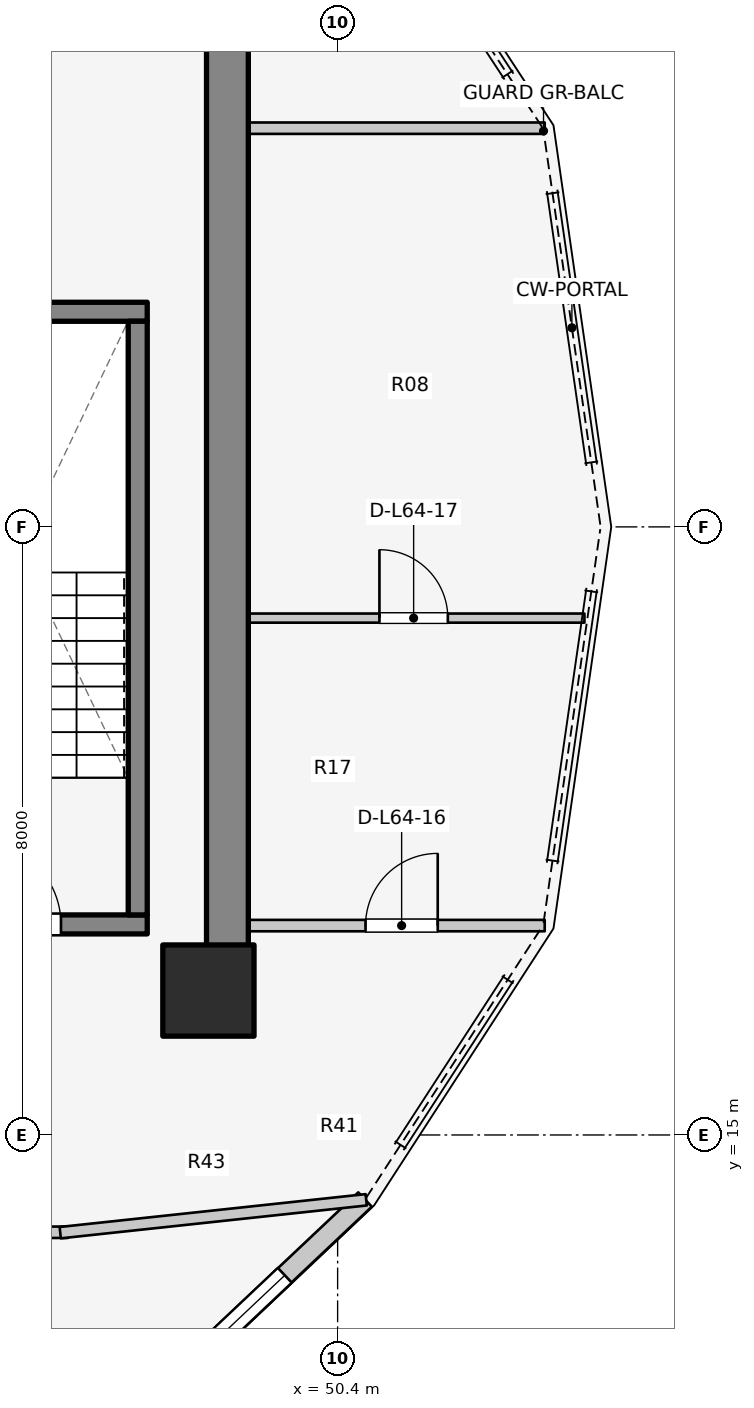
"""IFC4 building model, lengths in metres.
Left out: names, types, materials, properties, quantities, classifications, styles, units other than length and angle.
Written with IfcOpenShell. Run it as: python <this file> out.ifc"""

import sys

from ifc_helpers import new_model, si_unit, direction, frame, frame_2d, origin, origin_2d, place, context, subcontext, project, spatial, rectangle, extrude, element, fill, save


model = new_model("IFC4")
c1 = context("Model", 3, precision=1e-05, world=origin(), true_north=direction((0.0, 1.0)))
c2 = subcontext(c1, "Body", "Model", "MODEL_VIEW")
j1 = project(units=[si_unit("LENGTHUNIT", "METRE"), si_unit("PLANEANGLEUNIT", "RADIAN")], contexts=[c1])
p1 = place(None, origin())
s1 = spatial("IfcSite", under=j1, at=p1, CompositionType="ELEMENT")
p2 = place(p1, origin())
s2 = spatial("IfcBuilding", under=s1, at=p2, CompositionType="ELEMENT")
p3 = place(p2, frame((0.0, 0.0, 210.9)))
s3 = spatial("IfcBuildingStorey", under=s2, at=p3, CompositionType="ELEMENT", Elevation=210.9)
p4 = place(p3, frame((48.95, 17.05, 0.0), z_axis=(0.0, 0.0, 1.0), x_axis=(0.0, 1.0, 0.0)))
e1 = element("IfcWall", 1, at=p4, inside=s3, PredefinedType="SHEAR", context=c2, shape_type="SweptSolid", body=[
    extrude(rectangle(XDim=12.8, YDim=0.55, at=frame_2d((6.4, 0.0))), origin(), (0.0, 0.0, 1.0), 3.1),
])
p5 = place(p3, frame((44.525, 17.77, 0.0), z_axis=(0.0, 0.0, 1.0), x_axis=(1.0, 0.0, 0.0)))
e2 = element("IfcWall", 2, at=p5, inside=s3, PredefinedType="SOLIDWALL", context=c2, shape_type="SweptSolid", body=[
    extrude(rectangle(XDim=3.37, YDim=0.25, at=frame_2d((1.685, 0.0))), origin(), (0.0, 0.0, 1.0), 3.1),
])
p6 = place(p5, frame((1.135, 0.0, 0.0)))
e3 = element("IfcOpeningElement", 3, at=p6, cuts=e2, PredefinedType="OPENING", context=c2, shape_type="SweptSolid", body=[
    extrude(rectangle(XDim=1.1, YDim=2.1, at=frame_2d((0.55, 1.05))), frame((0.0, 0.135, 0.0), z_axis=(0.0, -1.0, 0.0), x_axis=(1.0, 0.0, 0.0)), (0.0, 0.0, 1.0), 0.27),
])
p7 = place(p3, frame((44.525, 25.83, 0.0), z_axis=(0.0, 0.0, 1.0), x_axis=(1.0, 0.0, 0.0)))
e4 = element("IfcWall", 4, at=p7, inside=s3, PredefinedType="SOLIDWALL", context=c2, shape_type="SweptSolid", body=[
    extrude(rectangle(XDim=3.37, YDim=0.25, at=frame_2d((1.685, 0.0))), origin(), (0.0, 0.0, 1.0), 3.1),
])
p8 = place(p3, frame((47.77, 17.895, 0.0), z_axis=(0.0, 0.0, 1.0), x_axis=(0.0, 1.0, 0.0)))
e5 = element("IfcWall", 5, at=p8, inside=s3, PredefinedType="SOLIDWALL", context=c2, shape_type="SweptSolid", body=[
    extrude(rectangle(XDim=7.81, YDim=0.25, at=frame_2d((3.905, 0.0))), origin(), (0.0, 0.0, 1.0), 3.1),
])
p9 = place(p3, frame((48.7, 16.9, 0.0), z_axis=(0.0, 0.0, 1.0), x_axis=(1.0, 0.0, 0.0)))
e6 = element("IfcColumn", 6, at=p9, inside=s3, PredefinedType="COLUMN", context=c2, shape_type="SweptSolid", body=[
    extrude(rectangle(XDim=1.2, YDim=1.2, at=origin_2d()), origin(), (0.0, 0.0, 1.0), 3.1),
])
p10 = place(p3, frame((47.558, 11.128, 0.0), z_axis=(0.0, 0.0, 1.0), x_axis=(0.72731899451, 0.686299555752, 0.0)))
e7 = element("IfcWall", 7, at=p10, inside=s3, PredefinedType="STANDARD", context=c2, shape_type="SweptSolid", body=[
    extrude(rectangle(XDim=4.404, YDim=0.26, at=frame_2d((2.202, 0.0))), origin(), (0.0, 0.0, 1.0), 2.85),
])
p11 = place(p10, frame((1.452, 0.0, 0.75)))
e8 = element("IfcOpeningElement", 8, at=p11, cuts=e7, PredefinedType="OPENING", context=c2, shape_type="SweptSolid", body=[
    extrude(rectangle(XDim=1.5, YDim=1.6, at=frame_2d((0.75, 0.8))), frame((0.0, 0.14, 0.0), z_axis=(0.0, -1.0, 0.0), x_axis=(1.0, 0.0, 0.0)), (0.0, 0.0, 1.0), 0.28),
])
p12 = place(p3, frame((48.95, 17.755, 0.0), z_axis=(0.0, 0.0, 1.0), x_axis=(1.0, 0.0, 0.0)))
e9 = element("IfcWall", 9, at=p12, inside=s3, PredefinedType="PARTITIONING", context=c2, shape_type="SweptSolid", body=[
    extrude(rectangle(XDim=4.175, YDim=0.15, at=frame_2d((2.087, 0.0))), origin(), (0.0, 0.0, 1.0), 2.855),
])
p13 = place(p12, frame((1.817, 0.0, 0.0)))
e10 = element("IfcOpeningElement", 10, at=p13, cuts=e9, PredefinedType="OPENING", context=c2, shape_type="SweptSolid", body=[
    extrude(rectangle(XDim=0.95, YDim=2.1, at=frame_2d((0.475, 1.05))), frame((0.0, 0.085, 0.0), z_axis=(0.0, -1.0, 0.0), x_axis=(1.0, 0.0, 0.0)), (0.0, 0.0, 1.0), 0.17),
])
p14 = place(p3, frame((48.95, 28.245, 0.0), z_axis=(0.0, 0.0, 1.0), x_axis=(1.0, 0.0, 0.0)))
e11 = element("IfcWall", 11, at=p14, inside=s3, PredefinedType="PARTITIONING", context=c2, shape_type="SweptSolid", body=[
    extrude(rectangle(XDim=4.175, YDim=0.15, at=frame_2d((2.087, 0.0))), origin(), (0.0, 0.0, 1.0), 2.855),
])
p15 = place(p3, frame((48.95, 21.8, 0.0), z_axis=(0.0, 0.0, 1.0), x_axis=(1.0, 0.0, 0.0)))
e12 = element("IfcWall", 12, at=p15, inside=s3, PredefinedType="MOVABLE", context=c2, shape_type="SweptSolid", body=[
    extrude(rectangle(XDim=4.697, YDim=0.12, at=frame_2d((2.349, 0.0))), origin(), (0.0, 0.0, 1.0), 2.855),
])
p16 = place(p15, frame((2.0, 0.0, 0.0)))
e13 = element("IfcOpeningElement", 13, at=p16, cuts=e12, PredefinedType="OPENING", context=c2, shape_type="SweptSolid", body=[
    extrude(rectangle(XDim=0.9, YDim=2.1, at=frame_2d((0.45, 1.05))), frame((0.0, 0.07, 0.0), z_axis=(0.0, -1.0, 0.0), x_axis=(1.0, 0.0, 0.0)), (0.0, 0.0, 1.0), 0.14),
])
p17 = place(p3, frame((39.33, 13.72, 0.0), z_axis=(0.0, 0.0, 1.0), x_axis=(1.0, 0.0, 0.0)))
e14 = element("IfcWall", 14, at=p17, inside=s3, PredefinedType="PARTITIONING", context=c2, shape_type="SweptSolid", body=[
    extrude(rectangle(XDim=7.52, YDim=0.15, at=frame_2d((3.76, 0.0))), origin(), (0.0, 0.0, 1.0), 2.376),
])
p18 = place(p17, frame((5.22, 0.0, 0.0)))
e15 = element("IfcOpeningElement", 15, at=p18, cuts=e14, PredefinedType="OPENING", context=c2, shape_type="SweptSolid", body=[
    extrude(rectangle(XDim=0.9, YDim=2.1, at=frame_2d((0.45, 1.05))), frame((0.0, 0.085, 0.0), z_axis=(0.0, -1.0, 0.0), x_axis=(1.0, 0.0, 0.0)), (0.0, 0.0, 1.0), 0.17),
])
p19 = place(p3, frame((46.75, 13.715, 0.0), z_axis=(0.0, 0.0, 1.0), x_axis=(0.994275802046, 0.106843949134, 0.0)))
e16 = element("IfcWall", 16, at=p19, inside=s3, PredefinedType="PARTITIONING", context=c2, shape_type="SweptSolid", body=[
    extrude(rectangle(XDim=4.049, YDim=0.15, at=frame_2d((2.024, 0.0))), origin(), (0.0, 0.0, 1.0), 2.22),
])
p20 = place(p11, origin())
e17 = element("IfcWindow", 17, at=p20, inside=s3, PartitioningType="SINGLE_PANEL", PredefinedType="WINDOW", context=c2, shape_type="SweptSolid", body=[
    extrude(rectangle(XDim=1.5, YDim=1.6, at=frame_2d((0.75, 0.8))), frame((0.0, 0.03, 0.0), z_axis=(0.0, -1.0, 0.0), x_axis=(1.0, 0.0, 0.0)), (0.0, 0.0, 1.0), 0.06),
])
fill(e8, e17)
p21 = place(p6, origin())
e18 = element("IfcDoor", 18, at=p21, inside=s3, OperationType="SINGLE_SWING_LEFT", PredefinedType="DOOR", context=c2, shape_type="SweptSolid", body=[
    extrude(rectangle(XDim=1.1, YDim=2.1, at=frame_2d((0.55, 1.05))), frame((0.0, 0.025, 0.0), z_axis=(0.0, -1.0, 0.0), x_axis=(1.0, 0.0, 0.0)), (0.0, 0.0, 1.0), 0.05),
])
fill(e3, e18)
p22 = place(p13, origin())
e19 = element("IfcDoor", 19, at=p22, inside=s3, OperationType="SINGLE_SWING_RIGHT", PredefinedType="DOOR", context=c2, shape_type="SweptSolid", body=[
    extrude(rectangle(XDim=0.95, YDim=2.1, at=frame_2d((0.475, 1.05))), frame((0.0, 0.025, 0.0), z_axis=(0.0, -1.0, 0.0), x_axis=(1.0, 0.0, 0.0)), (0.0, 0.0, 1.0), 0.05),
])
fill(e10, e19)
p23 = place(p16, origin())
e20 = element("IfcDoor", 20, at=p23, inside=s3, OperationType="SINGLE_SWING_LEFT", PredefinedType="DOOR", context=c2, shape_type="SweptSolid", body=[
    extrude(rectangle(XDim=0.9, YDim=2.1, at=frame_2d((0.45, 1.05))), frame((0.0, 0.025, 0.0), z_axis=(0.0, -1.0, 0.0), x_axis=(1.0, 0.0, 0.0)), (0.0, 0.0, 1.0), 0.05),
])
fill(e13, e20)
save(model, sys.argv[1])
